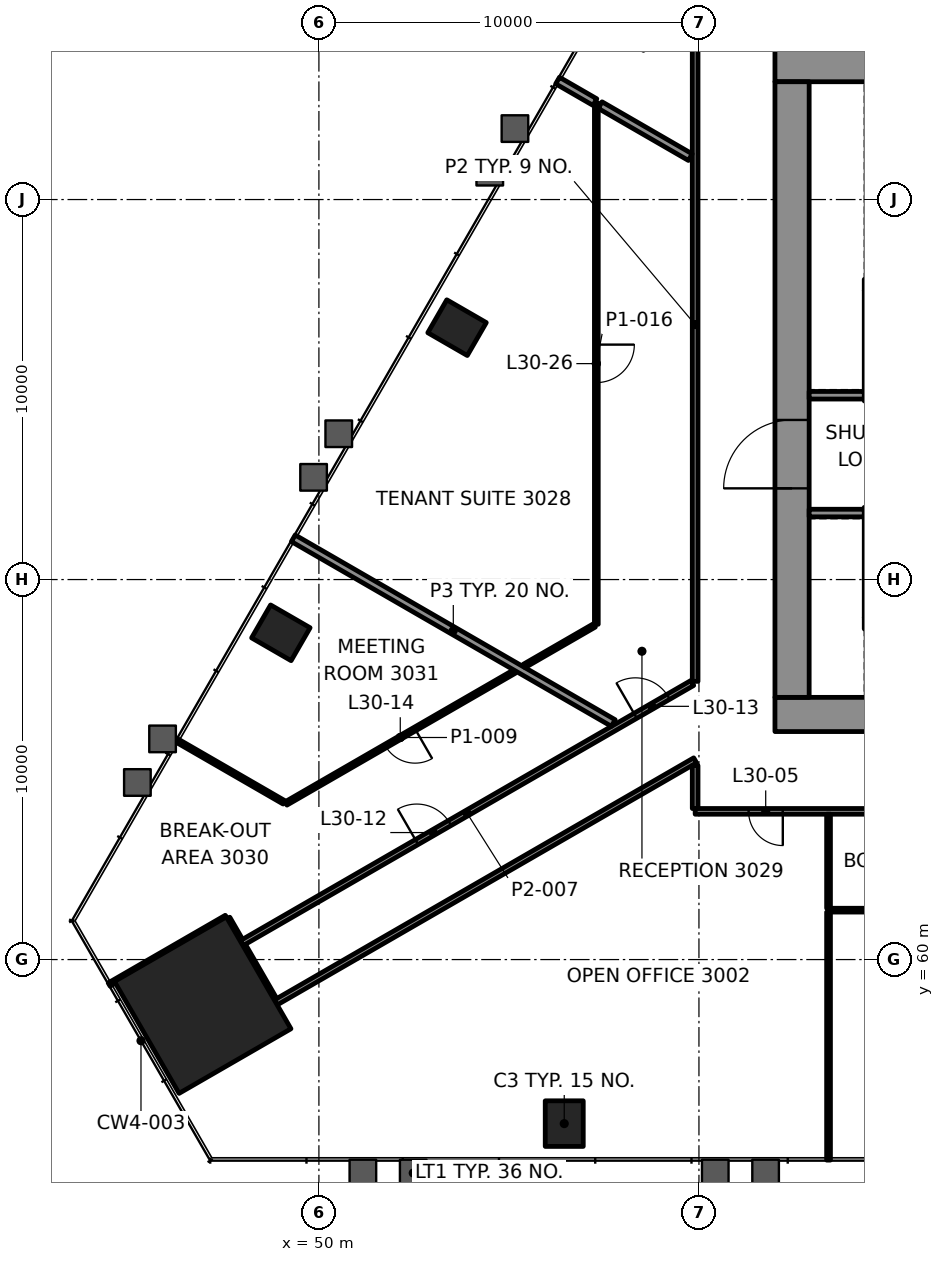
"""IFC4 building model, lengths in metres.
Left out: names, types, materials, properties, quantities, classifications, styles, units other than length and angle.
Written with IfcOpenShell. Run it as: python <this file> out.ifc"""

import sys

from ifc_helpers import new_model, si_unit, direction, frame, frame_2d, origin, origin_2d, place, context, subcontext, project, spatial, rectangle, extrude, element, fill, save


model = new_model("IFC4")
c1 = context("Model", 3, precision=1e-05, world=origin(), true_north=direction((0.0, 1.0)))
c2 = subcontext(c1, "Body", "Model", "MODEL_VIEW")
j1 = project(units=[si_unit("LENGTHUNIT", "METRE"), si_unit("PLANEANGLEUNIT", "RADIAN")], contexts=[c1])
p1 = place(None, origin())
s1 = spatial("IfcSite", under=j1, at=p1, CompositionType="ELEMENT")
p2 = place(p1, origin())
s2 = spatial("IfcBuilding", under=s1, at=p2, CompositionType="ELEMENT")
p3 = place(p2, frame((0.0, 0.0, 132.4)))
s3 = spatial("IfcBuildingStorey", under=s2, at=p3, CompositionType="ELEMENT", Elevation=132.4)
p4 = place(p3, frame((46.942, 58.801, 0.0), z_axis=(0.0, 0.0, 1.0), x_axis=(0.5, -0.866025403784, 0.0)))
e1 = element("IfcColumn", 1, at=p4, inside=s3, PredefinedType="COLUMN", context=c2, shape_type="SweptSolid", body=[
    extrude(rectangle(XDim=3.4, YDim=3.4, at=origin_2d()), origin(), (0.0, 0.0, 1.0), 4.2),
])
for number, where, z_axis, x_axis in (
    (2, (56.455, 55.683, -0.0), (0.0, 0.0, 1.0), (1.0, 0.0, 0.0)),
    (3, (53.635, 76.628, -0.0), (0.0, 0.0, 1.0), (-0.5, -0.866, 0.0)),
    (4, (48.999, 68.598, -0.0), (0.0, 0.0, 1.0), (-0.5, -0.866, 0.0)),
):
    element("IfcColumn", number, at=place(p3, frame(where, z_axis=z_axis, x_axis=x_axis)), inside=s3, PredefinedType="COLUMN", context=c2, shape_type="SweptSolid", body=[
        extrude(rectangle(XDim=1.0, YDim=1.2, at=origin_2d()), origin(), (0.0, 0.0, 1.0), 4.2),
    ])
p5 = place(p3, frame((62.0, 66.45, 0.0), z_axis=(0.0, 0.0, 1.0), x_axis=(1.0, 0.0, 0.0)))
e5 = element("IfcWall", 5, at=p5, inside=s3, PredefinedType="SHEAR", context=c2, shape_type="SweptSolid", body=[
    extrude(rectangle(XDim=26.0, YDim=0.9, at=frame_2d((13.0, 0.0))), origin(), (0.0, 0.0, 1.0), 4.0),
])
p6 = place(p5, frame((3.45, 0.0, 0.0)))
e6 = element("IfcOpeningElement", 6, at=p6, cuts=e5, PredefinedType="OPENING", context=c2, shape_type="SweptSolid", body=[
    extrude(rectangle(XDim=0.9, YDim=2.1, at=frame_2d((0.45, 1.05))), frame((0.0, 0.46, 0.0), z_axis=(0.0, -1.0, 0.0), x_axis=(1.0, 0.0, 0.0)), (0.0, 0.0, 1.0), 0.92),
])
p7 = place(p5, frame((6.425, 0.0, 0.0)))
e7 = element("IfcOpeningElement", 7, at=p7, cuts=e5, PredefinedType="OPENING", context=c2, shape_type="SweptSolid", body=[
    extrude(rectangle(XDim=0.9, YDim=2.1, at=frame_2d((0.45, 1.05))), frame((0.0, 0.46, 0.0), z_axis=(0.0, -1.0, 0.0), x_axis=(1.0, 0.0, 0.0)), (0.0, 0.0, 1.0), 0.92),
])
p8 = place(p5, frame((11.5, 0.0, 0.0)))
e8 = element("IfcOpeningElement", 8, at=p8, cuts=e5, PredefinedType="OPENING", context=c2, shape_type="SweptSolid", body=[
    extrude(rectangle(XDim=0.9, YDim=2.1, at=frame_2d((0.45, 1.05))), frame((0.0, 0.46, 0.0), z_axis=(0.0, -1.0, 0.0), x_axis=(1.0, 0.0, 0.0)), (0.0, 0.0, 1.0), 0.92),
])
p9 = place(p5, frame((18.5, 0.0, 0.0)))
e9 = element("IfcOpeningElement", 9, at=p9, cuts=e5, PredefinedType="OPENING", context=c2, shape_type="SweptSolid", body=[
    extrude(rectangle(XDim=0.9, YDim=2.1, at=frame_2d((0.45, 1.05))), frame((0.0, 0.46, 0.0), z_axis=(0.0, -1.0, 0.0), x_axis=(1.0, 0.0, 0.0)), (0.0, 0.0, 1.0), 0.92),
])
p10 = place(p5, frame((23.325, 0.0, 0.0)))
e10 = element("IfcOpeningElement", 10, at=p10, cuts=e5, PredefinedType="OPENING", context=c2, shape_type="SweptSolid", body=[
    extrude(rectangle(XDim=0.9, YDim=2.1, at=frame_2d((0.45, 1.05))), frame((0.0, 0.46, 0.0), z_axis=(0.0, -1.0, 0.0), x_axis=(1.0, 0.0, 0.0)), (0.0, 0.0, 1.0), 0.92),
])
p11 = place(p3, frame((62.0, 83.55, 0.0), z_axis=(0.0, 0.0, 1.0), x_axis=(1.0, 0.0, 0.0)))
e11 = element("IfcWall", 11, at=p11, inside=s3, PredefinedType="SHEAR", context=c2, shape_type="SweptSolid", body=[
    extrude(rectangle(XDim=25.1, YDim=0.9, at=frame_2d((12.55, 0.0))), origin(), (0.0, 0.0, 1.0), 4.0),
])
p12 = place(p11, frame((5.695, 0.0, 0.0)))
e12 = element("IfcOpeningElement", 12, at=p12, cuts=e11, PredefinedType="OPENING", context=c2, shape_type="SweptSolid", body=[
    extrude(rectangle(XDim=1.0, YDim=2.1, at=frame_2d((0.5, 1.05))), frame((0.0, 0.46, 0.0), z_axis=(0.0, -1.0, 0.0), x_axis=(1.0, 0.0, 0.0)), (0.0, 0.0, 1.0), 0.92),
])
p13 = place(p11, frame((19.505, 0.0, 0.0)))
e13 = element("IfcOpeningElement", 13, at=p13, cuts=e11, PredefinedType="OPENING", context=c2, shape_type="SweptSolid", body=[
    extrude(rectangle(XDim=1.0, YDim=2.1, at=frame_2d((0.5, 1.05))), frame((0.0, 0.46, 0.0), z_axis=(0.0, -1.0, 0.0), x_axis=(1.0, 0.0, 0.0)), (0.0, 0.0, 1.0), 0.92),
])
p14 = place(p11, frame((3.45, 0.0, 0.0)))
e14 = element("IfcOpeningElement", 14, at=p14, cuts=e11, PredefinedType="OPENING", context=c2, shape_type="SweptSolid", body=[
    extrude(rectangle(XDim=0.9, YDim=2.1, at=frame_2d((0.45, 1.05))), frame((0.0, 0.46, 0.0), z_axis=(0.0, -1.0, 0.0), x_axis=(1.0, 0.0, 0.0)), (0.0, 0.0, 1.0), 0.92),
])
p15 = place(p11, frame((12.65, 0.0, 0.0)))
e15 = element("IfcOpeningElement", 15, at=p15, cuts=e11, PredefinedType="OPENING", context=c2, shape_type="SweptSolid", body=[
    extrude(rectangle(XDim=0.9, YDim=2.1, at=frame_2d((0.45, 1.05))), frame((0.0, 0.46, 0.0), z_axis=(0.0, -1.0, 0.0), x_axis=(1.0, 0.0, 0.0)), (0.0, 0.0, 1.0), 0.92),
])
p16 = place(p11, frame((22.55, 0.0, 0.0)))
e16 = element("IfcOpeningElement", 16, at=p16, cuts=e11, PredefinedType="OPENING", context=c2, shape_type="SweptSolid", body=[
    extrude(rectangle(XDim=0.9, YDim=2.1, at=frame_2d((0.45, 1.05))), frame((0.0, 0.46, 0.0), z_axis=(0.0, -1.0, 0.0), x_axis=(1.0, 0.0, 0.0)), (0.0, 0.0, 1.0), 0.92),
])
p17 = place(p3, frame((62.45, 66.9, 0.0), z_axis=(0.0, 0.0, 1.0), x_axis=(0.0, 1.0, 0.0)))
e17 = element("IfcWall", 17, at=p17, inside=s3, PredefinedType="SHEAR", context=c2, shape_type="SweptSolid", body=[
    extrude(rectangle(XDim=16.2, YDim=0.9, at=frame_2d((8.1, 0.0))), origin(), (0.0, 0.0, 1.0), 4.0),
])
p18 = place(p17, frame((5.5, 0.0, 0.0)))
e18 = element("IfcOpeningElement", 18, at=p18, cuts=e17, PredefinedType="OPENING", context=c2, shape_type="SweptSolid", body=[
    extrude(rectangle(XDim=1.8, YDim=2.1, at=frame_2d((0.9, 1.05))), frame((0.0, 0.46, 0.0), z_axis=(0.0, -1.0, 0.0), x_axis=(1.0, 0.0, 0.0)), (0.0, 0.0, 1.0), 0.92),
])
for number, where, z_axis, x_axis in (
    (19, (64.35, 68.85, 0.0), (0.0, 0.0, 1.0), (1.0, 0.0, 0.0)),
    (20, (64.35, 71.75, 0.0), (0.0, 0.0, 1.0), (1.0, 0.0, 0.0)),
    (21, (64.35, 74.85, 0.0), (0.0, 0.0, 1.0), (1.0, 0.0, 0.0)),
):
    element("IfcWall", number, at=place(p3, frame(where, z_axis=z_axis, x_axis=x_axis)), inside=s3, PredefinedType="SHEAR", context=c2, shape_type="SweptSolid", body=[
        extrude(rectangle(XDim=3.1, YDim=0.3, at=frame_2d((1.55, 0.0))), origin(), (0.0, 0.0, 1.0), 4.0),
    ])
for number, where, z_axis, x_axis in (
    (22, (64.5, 69.0, 0.0), (0.0, 0.0, 1.0), (0.0, 1.0, 0.0)),
    (23, (64.5, 75.0, 0.0), (0.0, 0.0, 1.0), (0.0, 1.0, 0.0)),
):
    element("IfcWall", number, at=place(p3, frame(where, z_axis=z_axis, x_axis=x_axis)), inside=s3, PredefinedType="SHEAR", context=c2, shape_type="SweptSolid", body=[
        extrude(rectangle(XDim=2.6, YDim=0.3, at=frame_2d((1.3, 0.0))), origin(), (0.0, 0.0, 1.0), 4.0),
    ])
p19 = place(p3, frame((64.35, 77.75, 0.0), z_axis=(0.0, 0.0, 1.0), x_axis=(1.0, 0.0, 0.0)))
e24 = element("IfcWall", 24, at=p19, inside=s3, PredefinedType="SHEAR", context=c2, shape_type="SweptSolid", body=[
    extrude(rectangle(XDim=22.75, YDim=0.3, at=frame_2d((11.375, 0.0))), origin(), (0.0, 0.0, 1.0), 4.0),
])
p20 = place(p19, frame((3.345, 0.0, 0.0)))
e25 = element("IfcOpeningElement", 25, at=p20, cuts=e24, PredefinedType="OPENING", context=c2, shape_type="SweptSolid", body=[
    extrude(rectangle(XDim=1.0, YDim=2.1, at=frame_2d((0.5, 1.05))), frame((0.0, 0.16, 0.0), z_axis=(0.0, -1.0, 0.0), x_axis=(1.0, 0.0, 0.0)), (0.0, 0.0, 1.0), 0.32),
])
p21 = place(p3, frame((63.41, 61.3, 0.0), z_axis=(0.0, 0.0, 1.0), x_axis=(1.0, 0.0, 0.0)))
e26 = element("IfcWall", 26, at=p21, inside=s3, PredefinedType="PARTITIONING", context=c2, shape_type="SweptSolid", body=[
    extrude(rectangle(XDim=28.319, YDim=0.1, at=frame_2d((14.16, 0.0))), origin(), (0.0, 0.0, 1.0), 3.4),
])
p22 = place(p21, frame((7.613, 0.0, 0.0)))
e27 = element("IfcOpeningElement", 27, at=p22, cuts=e26, PredefinedType="OPENING", context=c2, shape_type="SweptSolid", body=[
    extrude(rectangle(XDim=1.2, YDim=2.1, at=frame_2d((0.6, 1.05))), frame((0.0, 0.06, 0.0), z_axis=(0.0, -1.0, 0.0), x_axis=(1.0, 0.0, 0.0)), (0.0, 0.0, 1.0), 0.12),
])
p23 = place(p21, frame((21.573, 0.0, 0.0)))
e28 = element("IfcOpeningElement", 28, at=p23, cuts=e26, PredefinedType="OPENING", context=c2, shape_type="SweptSolid", body=[
    extrude(rectangle(XDim=1.2, YDim=2.1, at=frame_2d((0.6, 1.05))), frame((0.0, 0.06, 0.0), z_axis=(0.0, -1.0, 0.0), x_axis=(1.0, 0.0, 0.0)), (0.0, 0.0, 1.0), 0.12),
])
p24 = place(p3, frame((90.1, 63.9, 0.0), z_axis=(0.0, 0.0, 1.0), x_axis=(-1.0, 0.0, 0.0)))
e29 = element("IfcWall", 29, at=p24, inside=s3, PredefinedType="PARTITIONING", context=c2, shape_type="SweptSolid", body=[
    extrude(rectangle(XDim=30.2, YDim=0.15, at=frame_2d((15.1, 0.0))), origin(), (0.0, 0.0, 1.0), 3.4),
])
p25 = place(p24, frame((4.833, 0.0, 0.0)))
e30 = element("IfcOpeningElement", 30, at=p25, cuts=e29, PredefinedType="OPENING", context=c2, shape_type="SweptSolid", body=[
    extrude(rectangle(XDim=1.0, YDim=2.1, at=frame_2d((0.5, 1.05))), frame((0.0, 0.085, 0.0), z_axis=(0.0, -1.0, 0.0), x_axis=(1.0, 0.0, 0.0)), (0.0, 0.0, 1.0), 0.17),
])
p26 = place(p24, frame((18.077, 0.0, 0.0)))
e31 = element("IfcOpeningElement", 31, at=p26, cuts=e29, PredefinedType="OPENING", context=c2, shape_type="SweptSolid", body=[
    extrude(rectangle(XDim=1.0, YDim=2.1, at=frame_2d((0.5, 1.05))), frame((0.0, 0.085, 0.0), z_axis=(0.0, -1.0, 0.0), x_axis=(1.0, 0.0, 0.0)), (0.0, 0.0, 1.0), 0.17),
])
p27 = place(p24, frame((27.893, 0.0, 0.0)))
e32 = element("IfcOpeningElement", 32, at=p27, cuts=e29, PredefinedType="OPENING", context=c2, shape_type="SweptSolid", body=[
    extrude(rectangle(XDim=0.9, YDim=2.1, at=frame_2d((0.45, 1.05))), frame((0.0, 0.085, 0.0), z_axis=(0.0, -1.0, 0.0), x_axis=(1.0, 0.0, 0.0)), (0.0, 0.0, 1.0), 0.17),
])
p28 = place(p3, frame((48.865, 58.872, 0.0), z_axis=(0.0, 0.0, 1.0), x_axis=(0.866019033468, 0.500011033549, 0.0)))
e33 = element("IfcWall", 33, at=p28, inside=s3, PredefinedType="PARTITIONING", context=c2, shape_type="SweptSolid", body=[
    extrude(rectangle(XDim=12.742, YDim=0.15, at=frame_2d((6.371, 0.0))), origin(), (0.0, 0.0, 1.0), 3.247),
])
p29 = place(p3, frame((47.967, 60.432, 0.0), z_axis=(0.0, 0.0, 1.0), x_axis=(0.866021388453, 0.500006954693, 0.0)))
e34 = element("IfcWall", 34, at=p29, inside=s3, PredefinedType="PARTITIONING", context=c2, shape_type="SweptSolid", body=[
    extrude(rectangle(XDim=13.693, YDim=0.15, at=frame_2d((6.846, 0.0))), origin(), (0.0, 0.0, 1.0), 3.4),
])
p30 = place(p29, frame((5.321, 0.0, 0.0)))
e35 = element("IfcOpeningElement", 35, at=p30, cuts=e34, PredefinedType="OPENING", context=c2, shape_type="SweptSolid", body=[
    extrude(rectangle(XDim=1.0, YDim=2.1, at=frame_2d((0.5, 1.05))), frame((0.0, 0.085, 0.0), z_axis=(0.0, -1.0, 0.0), x_axis=(1.0, 0.0, 0.0)), (0.0, 0.0, 1.0), 0.17),
])
p31 = place(p29, frame((11.964, 0.0, 0.0)))
e36 = element("IfcOpeningElement", 36, at=p31, cuts=e34, PredefinedType="OPENING", context=c2, shape_type="SweptSolid", body=[
    extrude(rectangle(XDim=1.0, YDim=2.1, at=frame_2d((0.5, 1.05))), frame((0.0, 0.085, 0.0), z_axis=(0.0, -1.0, 0.0), x_axis=(1.0, 0.0, 0.0)), (0.0, 0.0, 1.0), 0.17),
])
p32 = place(p3, frame((44.481, 59.343, 0.0), z_axis=(0.0, 0.0, 1.0), x_axis=(0.866008413041, 0.500029427677, 0.0)))
e37 = element("IfcWall", 37, at=p32, inside=s3, PredefinedType="PARTITIONING", context=c2, shape_type="SweptSolid", body=[
    extrude(rectangle(XDim=3.557, YDim=0.1, at=frame_2d((1.778, 0.0))), origin(), (0.0, 0.0, 1.0), 3.4),
])
p33 = place(p3, frame((55.148, 67.58, 0.0), z_axis=(0.0, 0.0, 1.0), x_axis=(-0.866019333862, -0.500010513267, 0.0)))
e38 = element("IfcWall", 38, at=p33, inside=s3, PredefinedType="PARTITIONING", context=c2, shape_type="SweptSolid", body=[
    extrude(rectangle(XDim=6.945, YDim=0.1, at=frame_2d((3.473, 0.0))), origin(), (0.0, 0.0, 1.0), 3.4),
])
p34 = place(p33, frame((3.023, 0.0, 0.0)))
e39 = element("IfcOpeningElement", 39, at=p34, cuts=e38, PredefinedType="OPENING", context=c2, shape_type="SweptSolid", body=[
    extrude(rectangle(XDim=0.9, YDim=2.1, at=frame_2d((0.45, 1.05))), frame((0.0, 0.06, 0.0), z_axis=(0.0, -1.0, 0.0), x_axis=(1.0, 0.0, 0.0)), (0.0, 0.0, 1.0), 0.12),
])
p35 = place(p3, frame((63.41, 54.723, 0.0), z_axis=(0.0, 0.0, 1.0), x_axis=(0.0, 1.0, 0.0)))
e40 = element("IfcWall", 40, at=p35, inside=s3, PredefinedType="PARTITIONING", context=c2, shape_type="SweptSolid", body=[
    extrude(rectangle(XDim=6.527, YDim=0.1, at=frame_2d((3.264, 0.0))), origin(), (0.0, 0.0, 1.0), 3.165),
])
p36 = place(p3, frame((59.9, 63.976, 0.0), z_axis=(0.0, 0.0, 1.0), x_axis=(0.0, 1.0, 0.0)))
e41 = element("IfcWall", 41, at=p36, inside=s3, PredefinedType="PARTITIONING", context=c2, shape_type="SweptSolid", body=[
    extrude(rectangle(XDim=1.131, YDim=0.15, at=frame_2d((0.565, 0.0))), origin(), (0.0, 0.0, 1.0), 3.247),
])
p37 = place(p3, frame((59.9, 67.321, 0.0), z_axis=(0.0, 0.0, 1.0), x_axis=(0.0, 1.0, 0.0)))
e42 = element("IfcWall", 42, at=p37, inside=s3, PredefinedType="PARTITIONING", context=c2, shape_type="SweptSolid", body=[
    extrude(rectangle(XDim=18.778, YDim=0.15, at=frame_2d((9.389, 0.0))), origin(), (0.0, 0.0, 1.0), 3.4),
])
p38 = place(p3, frame((57.3, 82.542, 0.0), z_axis=(0.0, 0.0, 1.0), x_axis=(0.0, -1.0, 0.0)))
e43 = element("IfcWall", 43, at=p38, inside=s3, PredefinedType="PARTITIONING", context=c2, shape_type="SweptSolid", body=[
    extrude(rectangle(XDim=13.72, YDim=0.1, at=frame_2d((6.86, 0.0))), origin(), (0.0, 0.0, 1.0), 3.4),
])
p39 = place(p38, frame((6.36, 0.0, 0.0)))
e44 = element("IfcOpeningElement", 44, at=p39, cuts=e43, PredefinedType="OPENING", context=c2, shape_type="SweptSolid", body=[
    extrude(rectangle(XDim=1.0, YDim=2.1, at=frame_2d((0.5, 1.05))), frame((0.0, 0.06, 0.0), z_axis=(0.0, -1.0, 0.0), x_axis=(1.0, 0.0, 0.0)), (0.0, 0.0, 1.0), 0.12),
])
p40 = place(p3, frame((48.826, 58.937, 0.0), z_axis=(0.0, 0.0, 1.0), x_axis=(-0.499991515992, 0.866030301974, 0.0)))
e45 = element("IfcWall", 45, at=p40, inside=s3, PredefinedType="PARTITIONING", context=c2, shape_type="SweptSolid", body=[
    extrude(rectangle(XDim=1.649, YDim=0.15, at=frame_2d((0.825, 0.0))), origin(), (0.0, 0.0, 1.0), 3.247),
])
p41 = place(p3, frame((59.773, 81.115, 0.0), z_axis=(0.0, 0.0, 1.0), x_axis=(-0.86604168154, 0.499971805041, 0.0)))
e46 = element("IfcWall", 46, at=p41, inside=s3, PredefinedType="PARTITIONING", context=c2, shape_type="SweptSolid", body=[
    extrude(rectangle(XDim=2.74, YDim=0.2, at=frame_2d((1.37, 0.0))), origin(), (0.0, 0.0, 1.0), 3.4),
])
p42 = place(p3, frame((57.746, 66.224, 0.0), z_axis=(0.0, 0.0, 1.0), x_axis=(-0.866017068849, 0.500014436255, 0.0)))
e47 = element("IfcWall", 47, at=p42, inside=s3, PredefinedType="PARTITIONING", context=c2, shape_type="SweptSolid", body=[
    extrude(rectangle(XDim=9.723, YDim=0.2, at=frame_2d((4.861, 0.0))), origin(), (0.0, 0.0, 1.0), 3.165),
])
p43 = place(p3, frame((49.083, 64.136, 0.0), z_axis=(0.0, 0.0, 1.0), x_axis=(-0.866048593798, 0.499959831567, 0.0)))
e48 = element("IfcWall", 48, at=p43, inside=s3, PredefinedType="PARTITIONING", context=c2, shape_type="SweptSolid", body=[
    extrude(rectangle(XDim=3.264, YDim=0.1, at=frame_2d((1.632, 0.0))), origin(), (0.0, 0.0, 1.0), 3.4),
])
p44 = place(p3, frame((47.927, 60.495, 0.0), z_axis=(0.0, 0.0, 1.0), x_axis=(-0.5000475079, 0.865997973348, 0.0)))
e49 = element("IfcWall", 49, at=p44, inside=s3, PredefinedType="PARTITIONING", context=c2, shape_type="SweptSolid", body=[
    extrude(rectangle(XDim=0.672, YDim=0.15, at=frame_2d((0.336, 0.0))), origin(), (0.0, 0.0, 1.0), 3.4),
])
p45 = place(p3, frame((55.398, 67.724, 0.0), z_axis=(0.0, 0.0, 1.0), x_axis=(0.866063918387, 0.499933284817, 0.0)))
e50 = element("IfcWall", 50, at=p45, inside=s3, PredefinedType="PARTITIONING", context=c2, shape_type="SweptSolid", body=[
    extrude(rectangle(XDim=2.138, YDim=0.1, at=frame_2d((1.069, 0.0))), origin(), (0.0, 0.0, 1.0), 3.4),
])
p46 = place(p3, frame((57.263, 82.564, 0.0), z_axis=(0.0, 0.0, 1.0), x_axis=(-0.8660349869, 0.499983401189, 0.0)))
e51 = element("IfcWall", 51, at=p46, inside=s3, PredefinedType="PARTITIONING", context=c2, shape_type="SweptSolid", body=[
    extrude(rectangle(XDim=1.134, YDim=0.2, at=frame_2d((0.567, 0.0))), origin(), (0.0, 0.0, 1.0), 3.165),
])
p47 = place(p3, frame((63.41, 61.35, 0.0), z_axis=(0.0, 0.0, 1.0), x_axis=(0.0, 1.0, 0.0)))
e52 = element("IfcWall", 52, at=p47, inside=s3, PredefinedType="PARTITIONING", context=c2, shape_type="SweptSolid", body=[
    extrude(rectangle(XDim=2.475, YDim=0.1, at=frame_2d((1.237, 0.0))), origin(), (0.0, 0.0, 1.0), 3.4),
])
for number, where, z_axis, x_axis in (
    (53, (62.9, 71.75, 0.0), (0.0, 0.0, 1.0), (1.0, 0.0, 0.0)),
    (54, (62.9, 74.85, 0.0), (0.0, 0.0, 1.0), (1.0, 0.0, 0.0)),
):
    element("IfcWall", number, at=place(p3, frame(where, z_axis=z_axis, x_axis=x_axis)), inside=s3, PredefinedType="PARTITIONING", context=c2, shape_type="SweptSolid", body=[
        extrude(rectangle(XDim=1.45, YDim=0.2, at=frame_2d((0.725, 0.0))), origin(), (0.0, 0.0, 1.0), 4.0),
    ])
p48 = place(p27, origin())
e55 = element("IfcDoor", 55, at=p48, inside=s3, OperationType="SINGLE_SWING_RIGHT", PredefinedType="DOOR", context=c2, shape_type="SweptSolid", body=[
    extrude(rectangle(XDim=0.9, YDim=2.1, at=frame_2d((0.45, 1.05))), frame((0.0, 0.025, 0.0), z_axis=(0.0, -1.0, 0.0), x_axis=(1.0, 0.0, 0.0)), (0.0, 0.0, 1.0), 0.05),
])
fill(e32, e55)
p49 = place(p30, origin())
e56 = element("IfcDoor", 56, at=p49, inside=s3, OperationType="SINGLE_SWING_LEFT", PredefinedType="DOOR", context=c2, shape_type="SweptSolid", body=[
    extrude(rectangle(XDim=1.0, YDim=2.1, at=frame_2d((0.5, 1.05))), frame((0.0, 0.025, 0.0), z_axis=(0.0, -1.0, 0.0), x_axis=(1.0, 0.0, 0.0)), (0.0, 0.0, 1.0), 0.05),
])
fill(e35, e56)
p50 = place(p31, origin())
e57 = element("IfcDoor", 57, at=p50, inside=s3, OperationType="SINGLE_SWING_RIGHT", PredefinedType="DOOR", context=c2, shape_type="SweptSolid", body=[
    extrude(rectangle(XDim=1.0, YDim=2.1, at=frame_2d((0.5, 1.05))), frame((0.0, 0.025, 0.0), z_axis=(0.0, -1.0, 0.0), x_axis=(1.0, 0.0, 0.0)), (0.0, 0.0, 1.0), 0.05),
])
fill(e36, e57)
p51 = place(p34, origin())
e58 = element("IfcDoor", 58, at=p51, inside=s3, OperationType="SINGLE_SWING_LEFT", PredefinedType="DOOR", context=c2, shape_type="SweptSolid", body=[
    extrude(rectangle(XDim=0.9, YDim=2.1, at=frame_2d((0.45, 1.05))), frame((0.0, 0.025, 0.0), z_axis=(0.0, -1.0, 0.0), x_axis=(1.0, 0.0, 0.0)), (0.0, 0.0, 1.0), 0.05),
])
fill(e39, e58)
p52 = place(p39, origin())
e59 = element("IfcDoor", 59, at=p52, inside=s3, OperationType="SINGLE_SWING_RIGHT", PredefinedType="DOOR", context=c2, shape_type="SweptSolid", body=[
    extrude(rectangle(XDim=1.0, YDim=2.1, at=frame_2d((0.5, 1.05))), frame((0.0, 0.025, 0.0), z_axis=(0.0, -1.0, 0.0), x_axis=(1.0, 0.0, 0.0)), (0.0, 0.0, 1.0), 0.05),
])
fill(e44, e59)
p53 = place(p18, origin())
e60 = element("IfcDoor", 60, at=p53, inside=s3, OperationType="SINGLE_SWING_LEFT", PredefinedType="DOOR", context=c2, shape_type="SweptSolid", body=[
    extrude(rectangle(XDim=1.8, YDim=2.1, at=frame_2d((0.9, 1.05))), frame((0.0, 0.17, 0.0), z_axis=(0.0, -1.0, 0.0), x_axis=(1.0, 0.0, 0.0)), (0.0, 0.0, 1.0), 0.34),
])
fill(e18, e60)
save(model, sys.argv[1])
